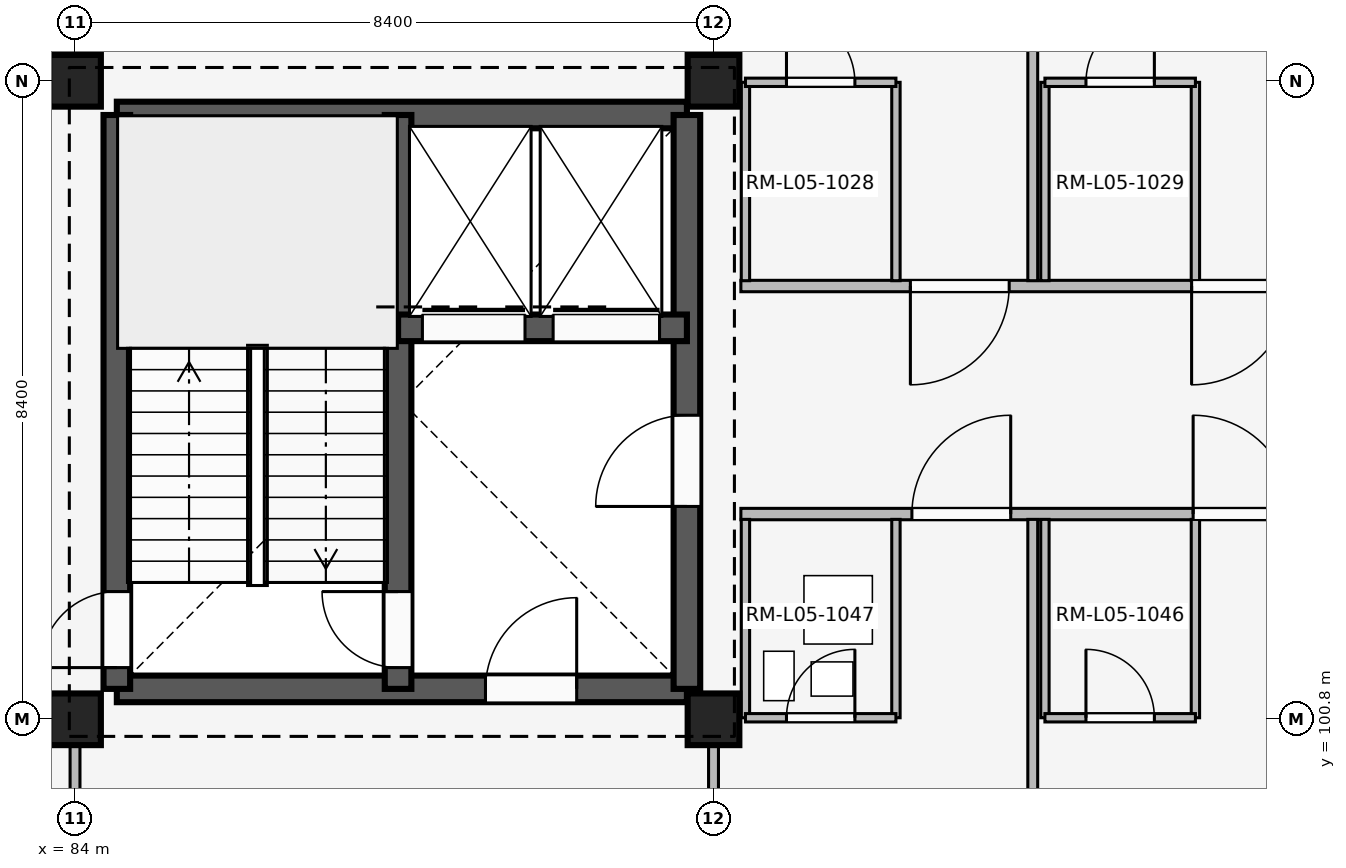
"""IFC4 building model, lengths in metres.
Left out: names, types, materials, properties, quantities, classifications, styles, units other than length and angle.
Written with IfcOpenShell. Run it as: python <this file> out.ifc"""

import sys

from ifc_helpers import new_model, si_unit, direction, frame, frame_2d, origin, origin_2d, place, context, subcontext, project, spatial, rectangle, extrude, element, fill, save


model = new_model("IFC4")
c1 = context("Model", 3, precision=1e-05, world=origin(), true_north=direction((0.0, 1.0)))
c2 = subcontext(c1, "Body", "Model", "MODEL_VIEW")
j1 = project(units=[si_unit("LENGTHUNIT", "METRE"), si_unit("PLANEANGLEUNIT", "RADIAN")], contexts=[c1])
p1 = place(None, origin())
s1 = spatial("IfcSite", under=j1, at=p1, CompositionType="ELEMENT")
p2 = place(p1, origin())
s2 = spatial("IfcBuilding", under=s1, at=p2, CompositionType="ELEMENT")
p3 = place(p2, frame((0.0, 0.0, 20.4)))
s3 = spatial("IfcBuildingStorey", under=s2, at=p3, CompositionType="ELEMENT", Elevation=20.4)
for number, where, z_axis, x_axis in (
    (1, (84.0, 100.8, 0.0), (0.0, 0.0, 1.0), (1.0, 0.0, 0.0)),
    (2, (84.0, 109.2, 0.0), (0.0, 0.0, 1.0), (1.0, 0.0, 0.0)),
    (3, (92.4, 100.8, 0.0), (0.0, 0.0, 1.0), (1.0, 0.0, 0.0)),
    (4, (92.4, 109.2, 0.0), (0.0, 0.0, 1.0), (1.0, 0.0, 0.0)),
):
    element("IfcColumn", number, at=place(p3, frame(where, z_axis=z_axis, x_axis=x_axis)), inside=s3, PredefinedType="COLUMN", context=c2, shape_type="SweptSolid", body=[
        extrude(rectangle(XDim=0.68, YDim=0.68, at=origin_2d()), origin(), (0.0, 0.0, 1.0), 4.2),
    ])
p4 = place(p3, frame((84.55, 101.2, 0.0), z_axis=(0.0, 0.0, 1.0), x_axis=(1.0, 0.0, 0.0)))
e5 = element("IfcWall", 5, at=p4, inside=s3, PredefinedType="SHEAR", context=c2, shape_type="SweptSolid", body=[
    extrude(rectangle(XDim=7.5, YDim=0.35, at=frame_2d((3.75, 0.0))), origin(), (0.0, 0.0, 1.0), 3.92),
])
p5 = place(p4, frame((4.85, 0.0, 0.0)))
e6 = element("IfcOpeningElement", 6, at=p5, cuts=e5, PredefinedType="OPENING", context=c2, shape_type="SweptSolid", body=[
    extrude(rectangle(XDim=1.2, YDim=2.2, at=frame_2d((0.6, 1.1))), frame((0.0, 0.185, 0.0), z_axis=(0.0, -1.0, 0.0), x_axis=(1.0, 0.0, 0.0)), (0.0, 0.0, 1.0), 0.37),
])
p6 = place(p3, frame((84.55, 108.75, 0.0), z_axis=(0.0, 0.0, 1.0), x_axis=(1.0, 0.0, 0.0)))
e7 = element("IfcWall", 7, at=p6, inside=s3, PredefinedType="SHEAR", context=c2, shape_type="SweptSolid", body=[
    extrude(rectangle(XDim=7.5, YDim=0.35, at=frame_2d((3.75, 0.0))), origin(), (0.0, 0.0, 1.0), 3.92),
])
p7 = place(p3, frame((84.55, 101.2, 0.0), z_axis=(0.0, 0.0, 1.0), x_axis=(0.0, 1.0, 0.0)))
e8 = element("IfcWall", 8, at=p7, inside=s3, PredefinedType="SHEAR", context=c2, shape_type="SweptSolid", body=[
    extrude(rectangle(XDim=7.55, YDim=0.35, at=frame_2d((3.775, 0.0))), origin(), (0.0, 0.0, 1.0), 3.92),
])
p8 = place(p7, frame((0.28, 0.0, 0.0)))
e9 = element("IfcOpeningElement", 9, at=p8, cuts=e8, PredefinedType="OPENING", context=c2, shape_type="SweptSolid", body=[
    extrude(rectangle(XDim=1.0, YDim=2.15, at=frame_2d((0.5, 1.075))), frame((0.0, 0.185, 0.0), z_axis=(0.0, -1.0, 0.0), x_axis=(1.0, 0.0, 0.0)), (0.0, 0.0, 1.0), 0.37),
])
p9 = place(p3, frame((92.05, 101.2, 0.0), z_axis=(0.0, 0.0, 1.0), x_axis=(0.0, 1.0, 0.0)))
e10 = element("IfcWall", 10, at=p9, inside=s3, PredefinedType="SHEAR", context=c2, shape_type="SweptSolid", body=[
    extrude(rectangle(XDim=7.55, YDim=0.35, at=frame_2d((3.775, 0.0))), origin(), (0.0, 0.0, 1.0), 3.92),
])
p10 = place(p9, frame((2.4, 0.0, 0.0)))
e11 = element("IfcOpeningElement", 11, at=p10, cuts=e10, PredefinedType="OPENING", context=c2, shape_type="SweptSolid", body=[
    extrude(rectangle(XDim=1.2, YDim=2.2, at=frame_2d((0.6, 1.1))), frame((0.0, 0.185, 0.0), z_axis=(0.0, -1.0, 0.0), x_axis=(1.0, 0.0, 0.0)), (0.0, 0.0, 1.0), 0.37),
])
p11 = place(p3, frame((88.25, 101.2, 0.0), z_axis=(0.0, 0.0, 1.0), x_axis=(0.0, 1.0, 0.0)))
e12 = element("IfcWall", 12, at=p11, inside=s3, PredefinedType="SHEAR", context=c2, shape_type="SweptSolid", body=[
    extrude(rectangle(XDim=7.55, YDim=0.35, at=frame_2d((3.775, 0.0))), origin(), (0.0, 0.0, 1.0), 3.92),
])
p12 = place(p11, frame((0.28, 0.0, 0.0)))
e13 = element("IfcOpeningElement", 13, at=p12, cuts=e12, PredefinedType="OPENING", context=c2, shape_type="SweptSolid", body=[
    extrude(rectangle(XDim=1.0, YDim=2.15, at=frame_2d((0.5, 1.075))), frame((0.0, 0.185, 0.0), z_axis=(0.0, -1.0, 0.0), x_axis=(1.0, 0.0, 0.0)), (0.0, 0.0, 1.0), 0.37),
])
p13 = place(p3, frame((88.25, 105.95, 0.0), z_axis=(0.0, 0.0, 1.0), x_axis=(1.0, 0.0, 0.0)))
e14 = element("IfcWall", 14, at=p13, inside=s3, PredefinedType="SHEAR", context=c2, shape_type="SweptSolid", body=[
    extrude(rectangle(XDim=3.8, YDim=0.35, at=frame_2d((1.9, 0.0))), origin(), (0.0, 0.0, 1.0), 3.92),
])
p14 = place(p13, frame((0.32, 0.0, 0.0)))
e15 = element("IfcOpeningElement", 15, at=p14, cuts=e14, PredefinedType="OPENING", context=c2, shape_type="SweptSolid", body=[
    extrude(rectangle(XDim=1.35, YDim=2.25, at=frame_2d((0.675, 1.125))), frame((0.0, 0.185, 0.0), z_axis=(0.0, -1.0, 0.0), x_axis=(1.0, 0.0, 0.0)), (0.0, 0.0, 1.0), 0.37),
])
p15 = place(p13, frame((2.04, 0.0, 0.0)))
e16 = element("IfcOpeningElement", 16, at=p15, cuts=e14, PredefinedType="OPENING", context=c2, shape_type="SweptSolid", body=[
    extrude(rectangle(XDim=1.4, YDim=2.25, at=frame_2d((0.7, 1.125))), frame((0.0, 0.185, 0.0), z_axis=(0.0, -1.0, 0.0), x_axis=(1.0, 0.0, 0.0)), (0.0, 0.0, 1.0), 0.37),
])
p16 = place(p3, frame((84.0, 92.54, 0.0), z_axis=(0.0, 0.0, 1.0), x_axis=(0.0, 1.0, 0.0)))
e17 = element("IfcWall", 17, at=p16, inside=s3, PredefinedType="PARTITIONING", context=c2, shape_type="SweptSolid", body=[
    extrude(rectangle(XDim=8.21, YDim=0.13, at=frame_2d((4.105, 0.0))), origin(), (0.0, 0.0, 1.0), 3.32),
])
p17 = place(p16, frame((3.64, 0.0, 0.0)))
e18 = element("IfcOpeningElement", 18, at=p17, cuts=e17, PredefinedType="OPENING", context=c2, shape_type="SweptSolid", body=[
    extrude(rectangle(XDim=1.08, YDim=2.15, at=frame_2d((0.54, 1.075))), frame((0.0, 0.075, 0.0), z_axis=(0.0, -1.0, 0.0), x_axis=(1.0, 0.0, 0.0)), (0.0, 0.0, 1.0), 0.15),
])
p18 = place(p3, frame((84.0, 109.55, 0.0), z_axis=(0.0, 0.0, 1.0), x_axis=(0.0, 1.0, 0.0)))
e19 = element("IfcWall", 19, at=p18, inside=s3, PredefinedType="PARTITIONING", context=c2, shape_type="SweptSolid", body=[
    extrude(rectangle(XDim=7.91, YDim=0.13, at=frame_2d((3.955, 0.0))), origin(), (0.0, 0.0, 1.0), 3.32),
])
p19 = place(p18, frame((3.4, 0.0, 0.0)))
e20 = element("IfcOpeningElement", 20, at=p19, cuts=e19, PredefinedType="OPENING", context=c2, shape_type="SweptSolid", body=[
    extrude(rectangle(XDim=1.05, YDim=2.2, at=frame_2d((0.525, 1.1))), frame((0.0, 0.075, 0.0), z_axis=(0.0, -1.0, 0.0), x_axis=(1.0, 0.0, 0.0)), (0.0, 0.0, 1.0), 0.15),
])
p20 = place(p3, frame((92.4, 92.54, 0.0), z_axis=(0.0, 0.0, 1.0), x_axis=(0.0, 1.0, 0.0)))
e21 = element("IfcWall", 21, at=p20, inside=s3, PredefinedType="PARTITIONING", context=c2, shape_type="SweptSolid", body=[
    extrude(rectangle(XDim=8.21, YDim=0.13, at=frame_2d((4.105, 0.0))), origin(), (0.0, 0.0, 1.0), 3.32),
])
p21 = place(p20, frame((3.64, 0.0, 0.0)))
e22 = element("IfcOpeningElement", 22, at=p21, cuts=e21, PredefinedType="OPENING", context=c2, shape_type="SweptSolid", body=[
    extrude(rectangle(XDim=1.08, YDim=2.15, at=frame_2d((0.54, 1.075))), frame((0.0, 0.075, 0.0), z_axis=(0.0, -1.0, 0.0), x_axis=(1.0, 0.0, 0.0)), (0.0, 0.0, 1.0), 0.15),
])
p22 = place(p3, frame((92.4, 109.55, 0.0), z_axis=(0.0, 0.0, 1.0), x_axis=(0.0, 1.0, 0.0)))
e23 = element("IfcWall", 23, at=p22, inside=s3, PredefinedType="PARTITIONING", context=c2, shape_type="SweptSolid", body=[
    extrude(rectangle(XDim=7.91, YDim=0.13, at=frame_2d((3.955, 0.0))), origin(), (0.0, 0.0, 1.0), 3.32),
])
p23 = place(p22, frame((3.4, 0.0, 0.0)))
e24 = element("IfcOpeningElement", 24, at=p23, cuts=e23, PredefinedType="OPENING", context=c2, shape_type="SweptSolid", body=[
    extrude(rectangle(XDim=1.05, YDim=2.2, at=frame_2d((0.525, 1.1))), frame((0.0, 0.075, 0.0), z_axis=(0.0, -1.0, 0.0), x_axis=(1.0, 0.0, 0.0)), (0.0, 0.0, 1.0), 0.15),
])
p24 = place(p3, frame((92.76, 103.5, 0.0), z_axis=(0.0, 0.0, 1.0), x_axis=(1.0, 0.0, 0.0)))
e25 = element("IfcWall", 25, at=p24, inside=s3, PredefinedType="PARTITIONING", context=c2, shape_type="SweptSolid", body=[
    extrude(rectangle(XDim=7.96, YDim=0.15, at=frame_2d((3.98, 0.0))), origin(), (0.0, 0.0, 1.0), 3.32),
])
p25 = place(p24, frame((2.25, 0.0, 0.0)))
e26 = element("IfcOpeningElement", 26, at=p25, cuts=e25, PredefinedType="OPENING", context=c2, shape_type="SweptSolid", body=[
    extrude(rectangle(XDim=1.3, YDim=2.25, at=frame_2d((0.65, 1.125))), frame((0.0, 0.085, 0.0), z_axis=(0.0, -1.0, 0.0), x_axis=(1.0, 0.0, 0.0)), (0.0, 0.0, 1.0), 0.17),
])
p26 = place(p24, frame((5.95, 0.0, 0.0)))
e27 = element("IfcOpeningElement", 27, at=p26, cuts=e25, PredefinedType="OPENING", context=c2, shape_type="SweptSolid", body=[
    extrude(rectangle(XDim=1.3, YDim=2.25, at=frame_2d((0.65, 1.125))), frame((0.0, 0.085, 0.0), z_axis=(0.0, -1.0, 0.0), x_axis=(1.0, 0.0, 0.0)), (0.0, 0.0, 1.0), 0.17),
])
p27 = place(p3, frame((96.6, 92.5, 0.0), z_axis=(0.0, 0.0, 1.0), x_axis=(0.0, 1.0, 0.0)))
e28 = element("IfcWall", 28, at=p27, inside=s3, PredefinedType="PARTITIONING", context=c2, shape_type="SweptSolid", body=[
    extrude(rectangle(XDim=10.93, YDim=0.13, at=frame_2d((5.465, 0.0))), origin(), (0.0, 0.0, 1.0), 3.32),
])
for number, where, z_axis, x_axis in (
    (29, (92.82, 100.82, 0.0), (0.0, 0.0, 1.0), (0.0, 1.0, 0.0)),
    (30, (94.8, 100.82, 0.0), (0.0, 0.0, 1.0), (0.0, 1.0, 0.0)),
):
    element("IfcWall", number, at=place(p3, frame(where, z_axis=z_axis, x_axis=x_axis)), inside=s3, PredefinedType="PARTITIONING", context=c2, shape_type="SweptSolid", body=[
        extrude(rectangle(XDim=2.61, YDim=0.11, at=frame_2d((1.305, 0.0))), origin(), (0.0, 0.0, 1.0), 3.32),
    ])
p28 = place(p3, frame((92.82, 100.82, 0.0), z_axis=(0.0, 0.0, 1.0), x_axis=(1.0, 0.0, 0.0)))
e31 = element("IfcWall", 31, at=p28, inside=s3, PredefinedType="PARTITIONING", context=c2, shape_type="SweptSolid", body=[
    extrude(rectangle(XDim=1.98, YDim=0.11, at=frame_2d((0.99, 0.0))), origin(), (0.0, 0.0, 1.0), 3.32),
])
p29 = place(p28, frame((0.54, 0.0, 0.0)))
e32 = element("IfcOpeningElement", 32, at=p29, cuts=e31, PredefinedType="OPENING", context=c2, shape_type="SweptSolid", body=[
    extrude(rectangle(XDim=0.9, YDim=2.1, at=frame_2d((0.45, 1.05))), frame((0.0, 0.065, 0.0), z_axis=(0.0, -1.0, 0.0), x_axis=(1.0, 0.0, 0.0)), (0.0, 0.0, 1.0), 0.13),
])
for number, where, z_axis, x_axis in (
    (33, (96.76, 100.82, 0.0), (0.0, 0.0, 1.0), (0.0, 1.0, 0.0)),
    (34, (98.74, 100.82, 0.0), (0.0, 0.0, 1.0), (0.0, 1.0, 0.0)),
):
    element("IfcWall", number, at=place(p3, frame(where, z_axis=z_axis, x_axis=x_axis)), inside=s3, PredefinedType="PARTITIONING", context=c2, shape_type="SweptSolid", body=[
        extrude(rectangle(XDim=2.61, YDim=0.11, at=frame_2d((1.305, 0.0))), origin(), (0.0, 0.0, 1.0), 3.32),
    ])
p30 = place(p3, frame((96.76, 100.82, 0.0), z_axis=(0.0, 0.0, 1.0), x_axis=(1.0, 0.0, 0.0)))
e35 = element("IfcWall", 35, at=p30, inside=s3, PredefinedType="PARTITIONING", context=c2, shape_type="SweptSolid", body=[
    extrude(rectangle(XDim=1.98, YDim=0.11, at=frame_2d((0.99, 0.0))), origin(), (0.0, 0.0, 1.0), 3.32),
])
p31 = place(p30, frame((0.54, 0.0, 0.0)))
e36 = element("IfcOpeningElement", 36, at=p31, cuts=e35, PredefinedType="OPENING", context=c2, shape_type="SweptSolid", body=[
    extrude(rectangle(XDim=0.9, YDim=2.1, at=frame_2d((0.45, 1.05))), frame((0.0, 0.065, 0.0), z_axis=(0.0, -1.0, 0.0), x_axis=(1.0, 0.0, 0.0)), (0.0, 0.0, 1.0), 0.13),
])
p32 = place(p3, frame((100.72, 106.5, 0.0), z_axis=(0.0, 0.0, 1.0), x_axis=(-1.0, 0.0, 0.0)))
e37 = element("IfcWall", 37, at=p32, inside=s3, PredefinedType="PARTITIONING", context=c2, shape_type="SweptSolid", body=[
    extrude(rectangle(XDim=7.96, YDim=0.15, at=frame_2d((3.98, 0.0))), origin(), (0.0, 0.0, 1.0), 3.32),
])
p33 = place(p32, frame((0.73, 0.0, 0.0)))
e38 = element("IfcOpeningElement", 38, at=p33, cuts=e37, PredefinedType="OPENING", context=c2, shape_type="SweptSolid", body=[
    extrude(rectangle(XDim=1.3, YDim=2.25, at=frame_2d((0.65, 1.125))), frame((0.0, 0.085, 0.0), z_axis=(0.0, -1.0, 0.0), x_axis=(1.0, 0.0, 0.0)), (0.0, 0.0, 1.0), 0.17),
])
p34 = place(p32, frame((4.43, 0.0, 0.0)))
e39 = element("IfcOpeningElement", 39, at=p34, cuts=e37, PredefinedType="OPENING", context=c2, shape_type="SweptSolid", body=[
    extrude(rectangle(XDim=1.3, YDim=2.25, at=frame_2d((0.65, 1.125))), frame((0.0, 0.085, 0.0), z_axis=(0.0, -1.0, 0.0), x_axis=(1.0, 0.0, 0.0)), (0.0, 0.0, 1.0), 0.17),
])
p35 = place(p3, frame((96.6, 106.57, 0.0), z_axis=(0.0, 0.0, 1.0), x_axis=(0.0, 1.0, 0.0)))
e40 = element("IfcWall", 40, at=p35, inside=s3, PredefinedType="PARTITIONING", context=c2, shape_type="SweptSolid", body=[
    extrude(rectangle(XDim=10.93, YDim=0.13, at=frame_2d((5.465, 0.0))), origin(), (0.0, 0.0, 1.0), 3.32),
])
for number, where, z_axis, x_axis in (
    (41, (92.82, 106.57, 0.0), (0.0, 0.0, 1.0), (0.0, 1.0, 0.0)),
    (42, (94.8, 106.57, 0.0), (0.0, 0.0, 1.0), (0.0, 1.0, 0.0)),
):
    element("IfcWall", number, at=place(p3, frame(where, z_axis=z_axis, x_axis=x_axis)), inside=s3, PredefinedType="PARTITIONING", context=c2, shape_type="SweptSolid", body=[
        extrude(rectangle(XDim=2.61, YDim=0.11, at=frame_2d((1.305, 0.0))), origin(), (0.0, 0.0, 1.0), 3.32),
    ])
p36 = place(p3, frame((92.82, 109.18, 0.0), z_axis=(0.0, 0.0, 1.0), x_axis=(1.0, 0.0, 0.0)))
e43 = element("IfcWall", 43, at=p36, inside=s3, PredefinedType="PARTITIONING", context=c2, shape_type="SweptSolid", body=[
    extrude(rectangle(XDim=1.98, YDim=0.11, at=frame_2d((0.99, 0.0))), origin(), (0.0, 0.0, 1.0), 3.32),
])
p37 = place(p36, frame((0.54, 0.0, 0.0)))
e44 = element("IfcOpeningElement", 44, at=p37, cuts=e43, PredefinedType="OPENING", context=c2, shape_type="SweptSolid", body=[
    extrude(rectangle(XDim=0.9, YDim=2.1, at=frame_2d((0.45, 1.05))), frame((0.0, 0.065, 0.0), z_axis=(0.0, -1.0, 0.0), x_axis=(1.0, 0.0, 0.0)), (0.0, 0.0, 1.0), 0.13),
])
for number, where, z_axis, x_axis in (
    (45, (96.76, 106.57, 0.0), (0.0, 0.0, 1.0), (0.0, 1.0, 0.0)),
    (46, (98.74, 106.57, 0.0), (0.0, 0.0, 1.0), (0.0, 1.0, 0.0)),
):
    element("IfcWall", number, at=place(p3, frame(where, z_axis=z_axis, x_axis=x_axis)), inside=s3, PredefinedType="PARTITIONING", context=c2, shape_type="SweptSolid", body=[
        extrude(rectangle(XDim=2.61, YDim=0.11, at=frame_2d((1.305, 0.0))), origin(), (0.0, 0.0, 1.0), 3.32),
    ])
p38 = place(p3, frame((96.76, 109.18, 0.0), z_axis=(0.0, 0.0, 1.0), x_axis=(1.0, 0.0, 0.0)))
e47 = element("IfcWall", 47, at=p38, inside=s3, PredefinedType="PARTITIONING", context=c2, shape_type="SweptSolid", body=[
    extrude(rectangle(XDim=1.98, YDim=0.11, at=frame_2d((0.99, 0.0))), origin(), (0.0, 0.0, 1.0), 3.32),
])
p39 = place(p38, frame((0.54, 0.0, 0.0)))
e48 = element("IfcOpeningElement", 48, at=p39, cuts=e47, PredefinedType="OPENING", context=c2, shape_type="SweptSolid", body=[
    extrude(rectangle(XDim=0.9, YDim=2.1, at=frame_2d((0.45, 1.05))), frame((0.0, 0.065, 0.0), z_axis=(0.0, -1.0, 0.0), x_axis=(1.0, 0.0, 0.0)), (0.0, 0.0, 1.0), 0.13),
])
p40 = place(p10, origin())
e49 = element("IfcDoor", 49, at=p40, inside=s3, OperationType="SINGLE_SWING_LEFT", PredefinedType="DOOR", context=c2, shape_type="SweptSolid", body=[
    extrude(rectangle(XDim=1.2, YDim=2.2, at=frame_2d((0.6, 1.1))), frame((0.0, 0.025, 0.0), z_axis=(0.0, -1.0, 0.0), x_axis=(1.0, 0.0, 0.0)), (0.0, 0.0, 1.0), 0.05),
])
fill(e11, e49)
p41 = place(p5, origin())
e50 = element("IfcDoor", 50, at=p41, inside=s3, OperationType="SINGLE_SWING_RIGHT", PredefinedType="DOOR", context=c2, shape_type="SweptSolid", body=[
    extrude(rectangle(XDim=1.2, YDim=2.2, at=frame_2d((0.6, 1.1))), frame((0.0, 0.025, 0.0), z_axis=(0.0, -1.0, 0.0), x_axis=(1.0, 0.0, 0.0)), (0.0, 0.0, 1.0), 0.05),
])
fill(e6, e50)
p42 = place(p8, origin())
e51 = element("IfcDoor", 51, at=p42, inside=s3, OperationType="SINGLE_SWING_LEFT", PredefinedType="DOOR", context=c2, shape_type="SweptSolid", body=[
    extrude(rectangle(XDim=1.0, YDim=2.15, at=frame_2d((0.5, 1.075))), frame((0.0, 0.025, 0.0), z_axis=(0.0, -1.0, 0.0), x_axis=(1.0, 0.0, 0.0)), (0.0, 0.0, 1.0), 0.05),
])
fill(e9, e51)
p43 = place(p12, origin())
e52 = element("IfcDoor", 52, at=p43, inside=s3, OperationType="SINGLE_SWING_RIGHT", PredefinedType="DOOR", context=c2, shape_type="SweptSolid", body=[
    extrude(rectangle(XDim=1.0, YDim=2.15, at=frame_2d((0.5, 1.075))), frame((0.0, 0.025, 0.0), z_axis=(0.0, -1.0, 0.0), x_axis=(1.0, 0.0, 0.0)), (0.0, 0.0, 1.0), 0.05),
])
fill(e13, e52)
p44 = place(p14, origin())
e53 = element("IfcDoor", 53, at=p44, inside=s3, OperationType="SLIDING_TO_LEFT", PredefinedType="DOOR", context=c2, shape_type="SweptSolid", body=[
    extrude(rectangle(XDim=1.35, YDim=2.25, at=frame_2d((0.675, 1.125))), frame((0.0, 0.025, 0.0), z_axis=(0.0, -1.0, 0.0), x_axis=(1.0, 0.0, 0.0)), (0.0, 0.0, 1.0), 0.05),
])
fill(e15, e53)
p45 = place(p15, origin())
e54 = element("IfcDoor", 54, at=p45, inside=s3, OperationType="SLIDING_TO_LEFT", PredefinedType="DOOR", context=c2, shape_type="SweptSolid", body=[
    extrude(rectangle(XDim=1.4, YDim=2.25, at=frame_2d((0.7, 1.125))), frame((0.0, 0.025, 0.0), z_axis=(0.0, -1.0, 0.0), x_axis=(1.0, 0.0, 0.0)), (0.0, 0.0, 1.0), 0.05),
])
fill(e16, e54)
p46 = place(p25, origin())
e55 = element("IfcDoor", 55, at=p46, inside=s3, OperationType="SINGLE_SWING_RIGHT", PredefinedType="DOOR", context=c2, shape_type="SweptSolid", body=[
    extrude(rectangle(XDim=1.3, YDim=2.25, at=frame_2d((0.65, 1.125))), frame((0.0, 0.025, 0.0), z_axis=(0.0, -1.0, 0.0), x_axis=(1.0, 0.0, 0.0)), (0.0, 0.0, 1.0), 0.05),
])
fill(e26, e55)
p47 = place(p26, origin())
e56 = element("IfcDoor", 56, at=p47, inside=s3, OperationType="SINGLE_SWING_LEFT", PredefinedType="DOOR", context=c2, shape_type="SweptSolid", body=[
    extrude(rectangle(XDim=1.3, YDim=2.25, at=frame_2d((0.65, 1.125))), frame((0.0, 0.025, 0.0), z_axis=(0.0, -1.0, 0.0), x_axis=(1.0, 0.0, 0.0)), (0.0, 0.0, 1.0), 0.05),
])
fill(e27, e56)
p48 = place(p29, origin())
e57 = element("IfcDoor", 57, at=p48, inside=s3, OperationType="SINGLE_SWING_RIGHT", PredefinedType="DOOR", context=c2, shape_type="SweptSolid", body=[
    extrude(rectangle(XDim=0.9, YDim=2.1, at=frame_2d((0.45, 1.05))), frame((0.0, 0.025, 0.0), z_axis=(0.0, -1.0, 0.0), x_axis=(1.0, 0.0, 0.0)), (0.0, 0.0, 1.0), 0.05),
])
fill(e32, e57)
p49 = place(p31, origin())
e58 = element("IfcDoor", 58, at=p49, inside=s3, OperationType="SINGLE_SWING_LEFT", PredefinedType="DOOR", context=c2, shape_type="SweptSolid", body=[
    extrude(rectangle(XDim=0.9, YDim=2.1, at=frame_2d((0.45, 1.05))), frame((0.0, 0.025, 0.0), z_axis=(0.0, -1.0, 0.0), x_axis=(1.0, 0.0, 0.0)), (0.0, 0.0, 1.0), 0.05),
])
fill(e36, e58)
p50 = place(p33, origin())
e59 = element("IfcDoor", 59, at=p50, inside=s3, OperationType="SINGLE_SWING_RIGHT", PredefinedType="DOOR", context=c2, shape_type="SweptSolid", body=[
    extrude(rectangle(XDim=1.3, YDim=2.25, at=frame_2d((0.65, 1.125))), frame((0.0, 0.025, 0.0), z_axis=(0.0, -1.0, 0.0), x_axis=(1.0, 0.0, 0.0)), (0.0, 0.0, 1.0), 0.05),
])
fill(e38, e59)
p51 = place(p34, origin())
e60 = element("IfcDoor", 60, at=p51, inside=s3, OperationType="SINGLE_SWING_RIGHT", PredefinedType="DOOR", context=c2, shape_type="SweptSolid", body=[
    extrude(rectangle(XDim=1.3, YDim=2.25, at=frame_2d((0.65, 1.125))), frame((0.0, 0.025, 0.0), z_axis=(0.0, -1.0, 0.0), x_axis=(1.0, 0.0, 0.0)), (0.0, 0.0, 1.0), 0.05),
])
fill(e39, e60)
p52 = place(p37, origin())
e61 = element("IfcDoor", 61, at=p52, inside=s3, OperationType="SINGLE_SWING_LEFT", PredefinedType="DOOR", context=c2, shape_type="SweptSolid", body=[
    extrude(rectangle(XDim=0.9, YDim=2.1, at=frame_2d((0.45, 1.05))), frame((0.0, 0.025, 0.0), z_axis=(0.0, -1.0, 0.0), x_axis=(1.0, 0.0, 0.0)), (0.0, 0.0, 1.0), 0.05),
])
fill(e44, e61)
p53 = place(p39, origin())
e62 = element("IfcDoor", 62, at=p53, inside=s3, OperationType="SINGLE_SWING_RIGHT", PredefinedType="DOOR", context=c2, shape_type="SweptSolid", body=[
    extrude(rectangle(XDim=0.9, YDim=2.1, at=frame_2d((0.45, 1.05))), frame((0.0, 0.025, 0.0), z_axis=(0.0, -1.0, 0.0), x_axis=(1.0, 0.0, 0.0)), (0.0, 0.0, 1.0), 0.05),
])
fill(e48, e62)
save(model, sys.argv[1])
